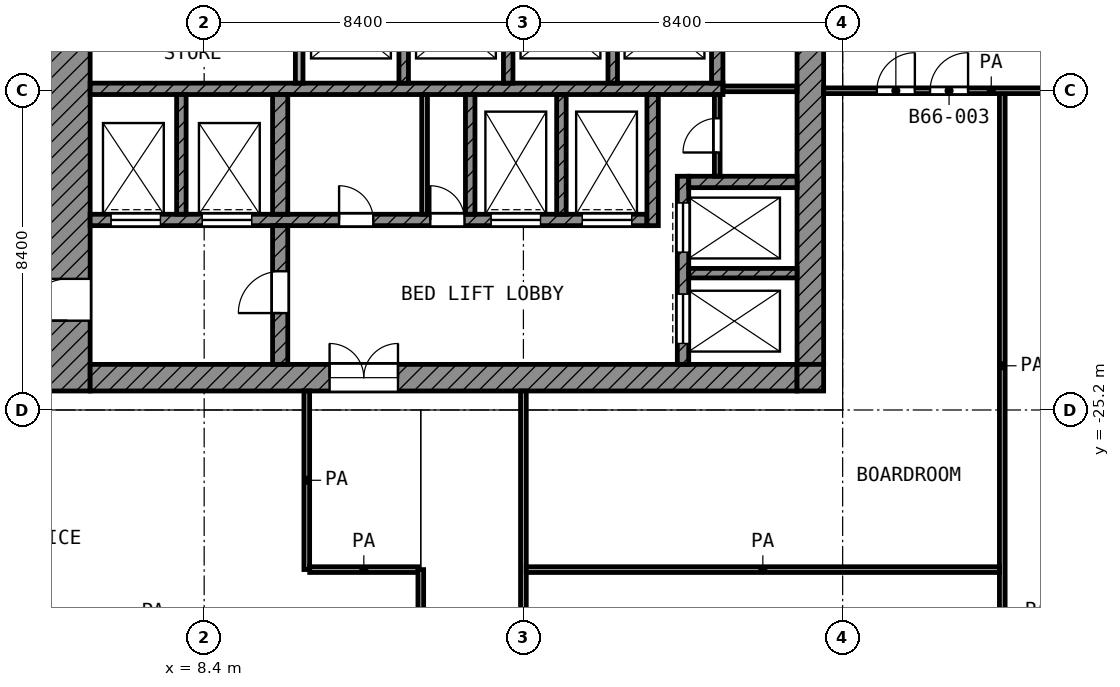
"""IFC4 building model, lengths in metres.
Left out: names, types, materials, properties, quantities, classifications, styles, units other than length and angle.
Written with IfcOpenShell. Run it as: python <this file> out.ifc"""

import sys

from ifc_helpers import new_model, si_unit, direction, frame, frame_2d, origin, place, context, subcontext, project, spatial, rectangle, extrude, element, fill, save


model = new_model("IFC4")
c1 = context("Model", 3, precision=1e-05, world=origin(), true_north=direction((0.0, 1.0)))
c2 = subcontext(c1, "Body", "Model", "MODEL_VIEW")
j1 = project(units=[si_unit("LENGTHUNIT", "METRE"), si_unit("PLANEANGLEUNIT", "RADIAN")], contexts=[c1])
p1 = place(None, origin())
s1 = spatial("IfcSite", under=j1, at=p1, CompositionType="ELEMENT")
p2 = place(p1, origin())
s2 = spatial("IfcBuilding", under=s1, at=p2, CompositionType="ELEMENT")
p3 = place(p2, frame((0.0, 0.0, 286.0)))
s3 = spatial("IfcBuildingStorey", under=s2, at=p3, CompositionType="ELEMENT", Elevation=286.0)
p4 = place(p3, frame((4.8, -24.7, 0.0), z_axis=(0.0, 0.0, 1.0), x_axis=(0.0, 1.0, 0.0)))
e1 = element("IfcWall", 1, at=p4, inside=s3, PredefinedType="SHEAR", context=c2, shape_type="SweptSolid", body=[
    extrude(rectangle(XDim=19.3, YDim=1.2, at=frame_2d((9.65, 0.0))), origin(), (0.0, 0.0, 1.0), 3.6),
])
p5 = place(p4, frame((11.15, 0.0, 0.0)))
e2 = element("IfcOpeningElement", 2, at=p5, cuts=e1, PredefinedType="OPENING", context=c2, shape_type="SweptSolid", body=[
    extrude(rectangle(XDim=1.1, YDim=2.1, at=frame_2d((0.55, 1.05))), frame((0.0, 0.61, 0.0), z_axis=(0.0, -1.0, 0.0), x_axis=(1.0, 0.0, 0.0)), (0.0, 0.0, 1.0), 1.22),
])
p6 = place(p4, frame((1.85, 0.0, 0.0)))
e3 = element("IfcOpeningElement", 3, at=p6, cuts=e1, PredefinedType="OPENING", context=c2, shape_type="SweptSolid", body=[
    extrude(rectangle(XDim=1.1, YDim=2.1, at=frame_2d((0.55, 1.05))), frame((0.0, 0.61, 0.0), z_axis=(0.0, -1.0, 0.0), x_axis=(1.0, 0.0, 0.0)), (0.0, 0.0, 1.0), 1.22),
])
p7 = place(p3, frame((24.35, -24.0, 0.0), z_axis=(0.0, 0.0, 1.0), x_axis=(0.0, 1.0, 0.0)))
e4 = element("IfcWall", 4, at=p7, inside=s3, PredefinedType="SHEAR", context=c2, shape_type="SweptSolid", body=[
    extrude(rectangle(XDim=18.6, YDim=0.7, at=frame_2d((9.3, 0.0))), origin(), (0.0, 0.0, 1.0), 3.6),
])
p8 = place(p7, frame((10.5, 0.0, 0.0)))
e5 = element("IfcOpeningElement", 5, at=p8, cuts=e4, PredefinedType="OPENING", context=c2, shape_type="SweptSolid", body=[
    extrude(rectangle(XDim=1.8, YDim=2.1, at=frame_2d((0.9, 1.05))), frame((0.0, 0.36, 0.0), z_axis=(0.0, -1.0, 0.0), x_axis=(1.0, 0.0, 0.0)), (0.0, 0.0, 1.0), 0.72),
])
p9 = place(p3, frame((5.4, -24.35, 0.0), z_axis=(0.0, 0.0, 1.0), x_axis=(1.0, 0.0, 0.0)))
e6 = element("IfcWall", 6, at=p9, inside=s3, PredefinedType="SHEAR", context=c2, shape_type="SweptSolid", body=[
    extrude(rectangle(XDim=18.6, YDim=0.7, at=frame_2d((9.3, 0.0))), origin(), (0.0, 0.0, 1.0), 3.6),
])
p10 = place(p9, frame((6.3, 0.0, 0.0)))
e7 = element("IfcOpeningElement", 7, at=p10, cuts=e6, PredefinedType="OPENING", context=c2, shape_type="SweptSolid", body=[
    extrude(rectangle(XDim=1.8, YDim=2.1, at=frame_2d((0.9, 1.05))), frame((0.0, 0.36, 0.0), z_axis=(0.0, -1.0, 0.0), x_axis=(1.0, 0.0, 0.0)), (0.0, 0.0, 1.0), 0.72),
])
p11 = place(p3, frame((24.35, -24.7, 0.0), z_axis=(0.0, 0.0, 1.0), x_axis=(0.0, 1.0, 0.0)))
e8 = element("IfcWall", 8, at=p11, inside=s3, PredefinedType="SHEAR", context=c2, shape_type="SweptSolid", body=[
    extrude(rectangle(XDim=0.7, YDim=0.7, at=frame_2d((0.35, 0.0))), origin(), (0.0, 0.0, 1.0), 3.6),
])
p12 = place(p3, frame((5.4, -16.75, 0.0), z_axis=(0.0, 0.0, 1.0), x_axis=(1.0, 0.0, 0.0)))
e9 = element("IfcWall", 9, at=p12, inside=s3, PredefinedType="SHEAR", context=c2, shape_type="SweptSolid", body=[
    extrude(rectangle(XDim=16.65, YDim=0.3, at=frame_2d((8.325, 0.0))), origin(), (0.0, 0.0, 1.0), 3.6),
])
p13 = place(p3, frame((5.4, -20.2, 0.0), z_axis=(0.0, 0.0, 1.0), x_axis=(1.0, 0.0, 0.0)))
e10 = element("IfcWall", 10, at=p13, inside=s3, PredefinedType="SHEAR", context=c2, shape_type="SweptSolid", body=[
    extrude(rectangle(XDim=14.65, YDim=0.3, at=frame_2d((7.325, 0.0))), origin(), (0.0, 0.0, 1.0), 3.6),
])
p14 = place(p13, frame((10.55, 0.0, 0.0)))
e11 = element("IfcOpeningElement", 11, at=p14, cuts=e10, PredefinedType="OPENING", context=c2, shape_type="SweptSolid", body=[
    extrude(rectangle(XDim=1.3, YDim=2.1, at=frame_2d((0.65, 1.05))), frame((0.0, 0.16, 0.0), z_axis=(0.0, -1.0, 0.0), x_axis=(1.0, 0.0, 0.0)), (0.0, 0.0, 1.0), 0.32),
])
p15 = place(p13, frame((12.95, 0.0, 0.0)))
e12 = element("IfcOpeningElement", 12, at=p15, cuts=e10, PredefinedType="OPENING", context=c2, shape_type="SweptSolid", body=[
    extrude(rectangle(XDim=1.3, YDim=2.1, at=frame_2d((0.65, 1.05))), frame((0.0, 0.16, 0.0), z_axis=(0.0, -1.0, 0.0), x_axis=(1.0, 0.0, 0.0)), (0.0, 0.0, 1.0), 0.32),
])
p16 = place(p13, frame((0.55, 0.0, 0.0)))
e13 = element("IfcOpeningElement", 13, at=p16, cuts=e10, PredefinedType="OPENING", context=c2, shape_type="SweptSolid", body=[
    extrude(rectangle(XDim=1.3, YDim=2.1, at=frame_2d((0.65, 1.05))), frame((0.0, 0.16, 0.0), z_axis=(0.0, -1.0, 0.0), x_axis=(1.0, 0.0, 0.0)), (0.0, 0.0, 1.0), 0.32),
])
p17 = place(p13, frame((2.95, 0.0, 0.0)))
e14 = element("IfcOpeningElement", 14, at=p17, cuts=e10, PredefinedType="OPENING", context=c2, shape_type="SweptSolid", body=[
    extrude(rectangle(XDim=1.3, YDim=2.1, at=frame_2d((0.65, 1.05))), frame((0.0, 0.16, 0.0), z_axis=(0.0, -1.0, 0.0), x_axis=(1.0, 0.0, 0.0)), (0.0, 0.0, 1.0), 0.32),
])
p18 = place(p13, frame((6.55, 0.0, 0.0)))
e15 = element("IfcOpeningElement", 15, at=p18, cuts=e10, PredefinedType="OPENING", context=c2, shape_type="SweptSolid", body=[
    extrude(rectangle(XDim=0.9, YDim=2.1, at=frame_2d((0.45, 1.05))), frame((0.0, 0.16, 0.0), z_axis=(0.0, -1.0, 0.0), x_axis=(1.0, 0.0, 0.0)), (0.0, 0.0, 1.0), 0.32),
])
p19 = place(p13, frame((8.95, 0.0, 0.0)))
e16 = element("IfcOpeningElement", 16, at=p19, cuts=e10, PredefinedType="OPENING", context=c2, shape_type="SweptSolid", body=[
    extrude(rectangle(XDim=0.9, YDim=2.1, at=frame_2d((0.45, 1.05))), frame((0.0, 0.16, 0.0), z_axis=(0.0, -1.0, 0.0), x_axis=(1.0, 0.0, 0.0)), (0.0, 0.0, 1.0), 0.32),
])
p20 = place(p3, frame((10.4, -24.0, 0.0), z_axis=(0.0, 0.0, 1.0), x_axis=(0.0, 1.0, 0.0)))
e17 = element("IfcWall", 17, at=p20, inside=s3, PredefinedType="SHEAR", context=c2, shape_type="SweptSolid", body=[
    extrude(rectangle(XDim=3.65, YDim=0.4, at=frame_2d((1.825, 0.0))), origin(), (0.0, 0.0, 1.0), 3.6),
])
p21 = place(p20, frame((1.35, 0.0, 0.0)))
e18 = element("IfcOpeningElement", 18, at=p21, cuts=e17, PredefinedType="OPENING", context=c2, shape_type="SweptSolid", body=[
    extrude(rectangle(XDim=1.1, YDim=2.1, at=frame_2d((0.55, 1.05))), frame((0.0, 0.21, 0.0), z_axis=(0.0, -1.0, 0.0), x_axis=(1.0, 0.0, 0.0)), (0.0, 0.0, 1.0), 0.42),
])
p22 = place(p3, frame((10.4, -20.05, 0.0), z_axis=(0.0, 0.0, 1.0), x_axis=(0.0, 1.0, 0.0)))
e19 = element("IfcWall", 19, at=p22, inside=s3, PredefinedType="SHEAR", context=c2, shape_type="SweptSolid", body=[
    extrude(rectangle(XDim=3.15, YDim=0.4, at=frame_2d((1.575, 0.0))), origin(), (0.0, 0.0, 1.0), 3.6),
])
p23 = place(p3, frame((20.2, -20.35, 0.0), z_axis=(0.0, 0.0, 1.0), x_axis=(0.0, 1.0, 0.0)))
e20 = element("IfcWall", 20, at=p23, inside=s3, PredefinedType="SHEAR", context=c2, shape_type="SweptSolid", body=[
    extrude(rectangle(XDim=3.45, YDim=0.3, at=frame_2d((1.725, 0.0))), origin(), (0.0, 0.0, 1.0), 3.6),
])
p24 = place(p3, frame((21.9, -16.6, 0.0), z_axis=(0.0, 0.0, 1.0), x_axis=(0.0, 1.0, 0.0)))
e21 = element("IfcWall", 21, at=p24, inside=s3, PredefinedType="SHEAR", context=c2, shape_type="SweptSolid", body=[
    extrude(rectangle(XDim=2.35, YDim=0.3, at=frame_2d((1.175, 0.0))), origin(), (0.0, 0.0, 1.0), 3.6),
])
p25 = place(p3, frame((21.15, -19.2, 0.0), z_axis=(0.0, 0.0, 1.0), x_axis=(1.0, 0.0, 0.0)))
e22 = element("IfcWall", 22, at=p25, inside=s3, PredefinedType="SHEAR", context=c2, shape_type="SweptSolid", body=[
    extrude(rectangle(XDim=2.85, YDim=0.3, at=frame_2d((1.425, 0.0))), origin(), (0.0, 0.0, 1.0), 3.6),
])
p26 = place(p3, frame((21.0, -24.0, 0.0), z_axis=(0.0, 0.0, 1.0), x_axis=(0.0, 1.0, 0.0)))
e23 = element("IfcWall", 23, at=p26, inside=s3, PredefinedType="SHEAR", context=c2, shape_type="SweptSolid", body=[
    extrude(rectangle(XDim=4.95, YDim=0.3, at=frame_2d((2.475, 0.0))), origin(), (0.0, 0.0, 1.0), 3.6),
])
p27 = place(p26, frame((2.95, 0.0, 0.0)))
e24 = element("IfcOpeningElement", 24, at=p27, cuts=e23, PredefinedType="OPENING", context=c2, shape_type="SweptSolid", body=[
    extrude(rectangle(XDim=1.3, YDim=2.1, at=frame_2d((0.65, 1.05))), frame((0.0, 0.16, 0.0), z_axis=(0.0, -1.0, 0.0), x_axis=(1.0, 0.0, 0.0)), (0.0, 0.0, 1.0), 0.32),
])
p28 = place(p26, frame((0.55, 0.0, 0.0)))
e25 = element("IfcOpeningElement", 25, at=p28, cuts=e23, PredefinedType="OPENING", context=c2, shape_type="SweptSolid", body=[
    extrude(rectangle(XDim=1.3, YDim=2.1, at=frame_2d((0.65, 1.05))), frame((0.0, 0.16, 0.0), z_axis=(0.0, -1.0, 0.0), x_axis=(1.0, 0.0, 0.0)), (0.0, 0.0, 1.0), 0.32),
])
p29 = place(p3, frame((21.15, -21.6, 0.0), z_axis=(0.0, 0.0, 1.0), x_axis=(1.0, 0.0, 0.0)))
e26 = element("IfcWall", 26, at=p29, inside=s3, PredefinedType="SHEAR", context=c2, shape_type="SweptSolid", body=[
    extrude(rectangle(XDim=2.85, YDim=0.25, at=frame_2d((1.425, 0.0))), origin(), (0.0, 0.0, 1.0), 3.6),
])
for number, where, z_axis, x_axis in (
    (27, (7.8, -20.05, 0.0), (0.0, 0.0, 1.0), (0.0, 1.0, 0.0)),
    (28, (15.4, -20.05, 0.0), (0.0, 0.0, 1.0), (0.0, 1.0, 0.0)),
    (29, (17.8, -20.05, 0.0), (0.0, 0.0, 1.0), (0.0, 1.0, 0.0)),
):
    element("IfcWall", number, at=place(p3, frame(where, z_axis=z_axis, x_axis=x_axis)), inside=s3, PredefinedType="SHEAR", context=c2, shape_type="SweptSolid", body=[
        extrude(rectangle(XDim=3.15, YDim=0.25, at=frame_2d((1.575, 0.0))), origin(), (0.0, 0.0, 1.0), 3.6),
    ])
p30 = place(p3, frame((10.9, -16.6, 0.0), z_axis=(0.0, 0.0, 1.0), x_axis=(0.0, 1.0, 0.0)))
e30 = element("IfcWall", 30, at=p30, inside=s3, PredefinedType="PARTITIONING", context=c2, shape_type="SweptSolid", body=[
    extrude(rectangle(XDim=2.35, YDim=0.2, at=frame_2d((1.175, 0.0))), origin(), (0.0, 0.0, 1.0), 3.6),
])
for number, where, z_axis, x_axis in (
    (31, (13.65, -16.6, 0.0), (0.0, 0.0, 1.0), (0.0, 1.0, 0.0)),
    (32, (16.4, -16.6, 0.0), (0.0, 0.0, 1.0), (0.0, 1.0, 0.0)),
    (33, (19.15, -16.6, 0.0), (0.0, 0.0, 1.0), (0.0, 1.0, 0.0)),
):
    element("IfcWall", number, at=place(p3, frame(where, z_axis=z_axis, x_axis=x_axis)), inside=s3, PredefinedType="SHEAR", context=c2, shape_type="SweptSolid", body=[
        extrude(rectangle(XDim=2.35, YDim=0.25, at=frame_2d((1.175, 0.0))), origin(), (0.0, 0.0, 1.0), 3.6),
    ])
p31 = place(p3, frame((21.9, -19.05, 0.0), z_axis=(0.0, 0.0, 1.0), x_axis=(0.0, 1.0, 0.0)))
e34 = element("IfcWall", 34, at=p31, inside=s3, PredefinedType="PARTITIONING", context=c2, shape_type="SweptSolid", body=[
    extrude(rectangle(XDim=2.15, YDim=0.15, at=frame_2d((1.075, 0.0))), origin(), (0.0, 0.0, 1.0), 3.6),
])
p32 = place(p31, frame((0.625, 0.0, 0.0)))
e35 = element("IfcOpeningElement", 35, at=p32, cuts=e34, PredefinedType="OPENING", context=c2, shape_type="SweptSolid", body=[
    extrude(rectangle(XDim=0.9, YDim=2.1, at=frame_2d((0.45, 1.05))), frame((0.0, 0.085, 0.0), z_axis=(0.0, -1.0, 0.0), x_axis=(1.0, 0.0, 0.0)), (0.0, 0.0, 1.0), 0.17),
])
p33 = place(p3, frame((22.05, -16.75, 0.0), z_axis=(0.0, 0.0, 1.0), x_axis=(1.0, 0.0, 0.0)))
e36 = element("IfcWall", 36, at=p33, inside=s3, PredefinedType="PARTITIONING", context=c2, shape_type="SweptSolid", body=[
    extrude(rectangle(XDim=1.95, YDim=0.15, at=frame_2d((0.975, 0.0))), origin(), (0.0, 0.0, 1.0), 3.6),
])
p34 = place(p3, frame((14.2, -20.05, 0.0), z_axis=(0.0, 0.0, 1.0), x_axis=(0.0, 1.0, 0.0)))
e37 = element("IfcWall", 37, at=p34, inside=s3, PredefinedType="PARTITIONING", context=c2, shape_type="SweptSolid", body=[
    extrude(rectangle(XDim=3.15, YDim=0.15, at=frame_2d((1.575, 0.0))), origin(), (0.0, 0.0, 1.0), 3.6),
])
p35 = place(p3, frame((11.177, -29.4, 0.0), z_axis=(0.0, 0.0, 1.0), x_axis=(1.0, 0.0, 0.0)))
e38 = element("IfcWall", 38, at=p35, inside=s3, PredefinedType="PARTITIONING", context=c2, shape_type="SweptSolid", body=[
    extrude(rectangle(XDim=2.848, YDim=0.15, at=frame_2d((1.424, 0.0))), origin(), (0.0, 0.0, 1.0), 3.6),
])
p36 = place(p3, frame((16.875, -29.4, 0.0), z_axis=(0.0, 0.0, 1.0), x_axis=(1.0, 0.0, 0.0)))
e39 = element("IfcWall", 39, at=p36, inside=s3, PredefinedType="PARTITIONING", context=c2, shape_type="SweptSolid", body=[
    extrude(rectangle(XDim=12.45, YDim=0.15, at=frame_2d((6.225, 0.0))), origin(), (0.0, 0.0, 1.0), 3.6),
])
p37 = place(p3, frame((24.7, -16.8, 0.0), z_axis=(0.0, 0.0, 1.0), x_axis=(1.0, 0.0, 0.0)))
e40 = element("IfcWall", 40, at=p37, inside=s3, PredefinedType="PARTITIONING", context=c2, shape_type="SweptSolid", body=[
    extrude(rectangle(XDim=8.82, YDim=0.15, at=frame_2d((4.41, 0.0))), origin(), (0.0, 0.0, 1.0), 3.6),
])
p38 = place(p37, frame((2.8, 0.0, 0.0)))
e41 = element("IfcOpeningElement", 41, at=p38, cuts=e40, PredefinedType="OPENING", context=c2, shape_type="SweptSolid", body=[
    extrude(rectangle(XDim=1.0, YDim=2.1, at=frame_2d((0.5, 1.05))), frame((0.0, 0.085, 0.0), z_axis=(0.0, -1.0, 0.0), x_axis=(1.0, 0.0, 0.0)), (0.0, 0.0, 1.0), 0.17),
])
p39 = place(p37, frame((1.4, 0.0, 0.0)))
e42 = element("IfcOpeningElement", 42, at=p39, cuts=e40, PredefinedType="OPENING", context=c2, shape_type="SweptSolid", body=[
    extrude(rectangle(XDim=1.0, YDim=2.1, at=frame_2d((0.5, 1.05))), frame((0.0, 0.085, 0.0), z_axis=(0.0, -1.0, 0.0), x_axis=(1.0, 0.0, 0.0)), (0.0, 0.0, 1.0), 0.17),
])
p40 = place(p37, frame((6.2, 0.0, 0.0)))
e43 = element("IfcOpeningElement", 43, at=p40, cuts=e40, PredefinedType="OPENING", context=c2, shape_type="SweptSolid", body=[
    extrude(rectangle(XDim=1.2, YDim=2.1, at=frame_2d((0.6, 1.05))), frame((0.0, 0.085, 0.0), z_axis=(0.0, -1.0, 0.0), x_axis=(1.0, 0.0, 0.0)), (0.0, 0.0, 1.0), 0.17),
])
p41 = place(p3, frame((11.1, -29.399, 0.0), z_axis=(0.0, 0.0, 1.0), x_axis=(0.0, 1.0, 0.0)))
e44 = element("IfcWall", 44, at=p41, inside=s3, PredefinedType="PARTITIONING", context=c2, shape_type="SweptSolid", body=[
    extrude(rectangle(XDim=4.699, YDim=0.15, at=frame_2d((2.35, 0.0))), origin(), (0.0, 0.0, 1.0), 3.6),
])
p42 = place(p3, frame((14.1, -31.957, 0.0), z_axis=(0.0, 0.0, 1.0), x_axis=(0.0, 1.0, 0.0)))
e45 = element("IfcWall", 45, at=p42, inside=s3, PredefinedType="PARTITIONING", context=c2, shape_type="SweptSolid", body=[
    extrude(rectangle(XDim=2.557, YDim=0.15, at=frame_2d((1.279, 0.0))), origin(), (0.0, 0.0, 1.0), 3.6),
])
p43 = place(p3, frame((16.8, -46.12, 0.0), z_axis=(0.0, 0.0, 1.0), x_axis=(0.0, 1.0, 0.0)))
e46 = element("IfcWall", 46, at=p43, inside=s3, PredefinedType="PARTITIONING", context=c2, shape_type="SweptSolid", body=[
    extrude(rectangle(XDim=21.42, YDim=0.15, at=frame_2d((10.71, 0.0))), origin(), (0.0, 0.0, 1.0), 3.6),
])
p44 = place(p43, frame((13.02, 0.0, 0.0)))
e47 = element("IfcOpeningElement", 47, at=p44, cuts=e46, PredefinedType="OPENING", context=c2, shape_type="SweptSolid", body=[
    extrude(rectangle(XDim=1.0, YDim=2.1, at=frame_2d((0.5, 1.05))), frame((0.0, 0.085, 0.0), z_axis=(0.0, -1.0, 0.0), x_axis=(1.0, 0.0, 0.0)), (0.0, 0.0, 1.0), 0.17),
])
p45 = place(p43, frame((6.02, 0.0, 0.0)))
e48 = element("IfcOpeningElement", 48, at=p45, cuts=e46, PredefinedType="OPENING", context=c2, shape_type="SweptSolid", body=[
    extrude(rectangle(XDim=1.0, YDim=2.1, at=frame_2d((0.5, 1.05))), frame((0.0, 0.085, 0.0), z_axis=(0.0, -1.0, 0.0), x_axis=(1.0, 0.0, 0.0)), (0.0, 0.0, 1.0), 0.17),
])
p46 = place(p43, frame((1.52, 0.0, 0.0)))
e49 = element("IfcOpeningElement", 49, at=p46, cuts=e46, PredefinedType="OPENING", context=c2, shape_type="SweptSolid", body=[
    extrude(rectangle(XDim=1.0, YDim=2.1, at=frame_2d((0.5, 1.05))), frame((0.0, 0.085, 0.0), z_axis=(0.0, -1.0, 0.0), x_axis=(1.0, 0.0, 0.0)), (0.0, 0.0, 1.0), 0.17),
])
p47 = place(p3, frame((29.4, -31.198, 0.0), z_axis=(0.0, 0.0, 1.0), x_axis=(0.0, 1.0, 0.0)))
e50 = element("IfcWall", 50, at=p47, inside=s3, PredefinedType="PARTITIONING", context=c2, shape_type="SweptSolid", body=[
    extrude(rectangle(XDim=14.323, YDim=0.15, at=frame_2d((7.162, 0.0))), origin(), (0.0, 0.0, 1.0), 3.6),
])
p48 = place(p27, origin())
e51 = element("IfcDoor", 51, at=p48, inside=s3, OperationType="DOUBLE_DOOR_SLIDING", PredefinedType="DOOR", context=c2, shape_type="SweptSolid", body=[
    extrude(rectangle(XDim=1.3, YDim=2.1, at=frame_2d((0.65, 1.05))), frame((0.0, 0.025, 0.0), z_axis=(0.0, -1.0, 0.0), x_axis=(1.0, 0.0, 0.0)), (0.0, 0.0, 1.0), 0.05),
])
fill(e24, e51)
p49 = place(p28, origin())
e52 = element("IfcDoor", 52, at=p49, inside=s3, OperationType="DOUBLE_DOOR_SLIDING", PredefinedType="DOOR", context=c2, shape_type="SweptSolid", body=[
    extrude(rectangle(XDim=1.3, YDim=2.1, at=frame_2d((0.65, 1.05))), frame((0.0, 0.025, 0.0), z_axis=(0.0, -1.0, 0.0), x_axis=(1.0, 0.0, 0.0)), (0.0, 0.0, 1.0), 0.05),
])
fill(e25, e52)
p50 = place(p14, origin())
e53 = element("IfcDoor", 53, at=p50, inside=s3, OperationType="DOUBLE_DOOR_SLIDING", PredefinedType="DOOR", context=c2, shape_type="SweptSolid", body=[
    extrude(rectangle(XDim=1.3, YDim=2.1, at=frame_2d((0.65, 1.05))), frame((0.0, 0.025, 0.0), z_axis=(0.0, -1.0, 0.0), x_axis=(1.0, 0.0, 0.0)), (0.0, 0.0, 1.0), 0.05),
])
fill(e11, e53)
p51 = place(p15, origin())
e54 = element("IfcDoor", 54, at=p51, inside=s3, OperationType="DOUBLE_DOOR_SLIDING", PredefinedType="DOOR", context=c2, shape_type="SweptSolid", body=[
    extrude(rectangle(XDim=1.3, YDim=2.1, at=frame_2d((0.65, 1.05))), frame((0.0, 0.025, 0.0), z_axis=(0.0, -1.0, 0.0), x_axis=(1.0, 0.0, 0.0)), (0.0, 0.0, 1.0), 0.05),
])
fill(e12, e54)
p52 = place(p16, origin())
e55 = element("IfcDoor", 55, at=p52, inside=s3, OperationType="DOUBLE_DOOR_SLIDING", PredefinedType="DOOR", context=c2, shape_type="SweptSolid", body=[
    extrude(rectangle(XDim=1.3, YDim=2.1, at=frame_2d((0.65, 1.05))), frame((0.0, 0.025, 0.0), z_axis=(0.0, -1.0, 0.0), x_axis=(1.0, 0.0, 0.0)), (0.0, 0.0, 1.0), 0.05),
])
fill(e13, e55)
p53 = place(p17, origin())
e56 = element("IfcDoor", 56, at=p53, inside=s3, OperationType="DOUBLE_DOOR_SLIDING", PredefinedType="DOOR", context=c2, shape_type="SweptSolid", body=[
    extrude(rectangle(XDim=1.3, YDim=2.1, at=frame_2d((0.65, 1.05))), frame((0.0, 0.025, 0.0), z_axis=(0.0, -1.0, 0.0), x_axis=(1.0, 0.0, 0.0)), (0.0, 0.0, 1.0), 0.05),
])
fill(e14, e56)
p54 = place(p6, origin())
e57 = element("IfcDoor", 57, at=p54, inside=s3, OperationType="SINGLE_SWING_LEFT", PredefinedType="DOOR", context=c2, shape_type="SweptSolid", body=[
    extrude(rectangle(XDim=1.1, YDim=2.1, at=frame_2d((0.55, 1.05))), frame((0.0, 0.025, 0.0), z_axis=(0.0, -1.0, 0.0), x_axis=(1.0, 0.0, 0.0)), (0.0, 0.0, 1.0), 0.05),
])
fill(e3, e57)
p55 = place(p21, origin())
e58 = element("IfcDoor", 58, at=p55, inside=s3, OperationType="SINGLE_SWING_LEFT", PredefinedType="DOOR", context=c2, shape_type="SweptSolid", body=[
    extrude(rectangle(XDim=1.1, YDim=2.1, at=frame_2d((0.55, 1.05))), frame((0.0, 0.025, 0.0), z_axis=(0.0, -1.0, 0.0), x_axis=(1.0, 0.0, 0.0)), (0.0, 0.0, 1.0), 0.05),
])
fill(e18, e58)
p56 = place(p10, origin())
e59 = element("IfcDoor", 59, at=p56, inside=s3, OperationType="DOUBLE_DOOR_SINGLE_SWING", PredefinedType="DOOR", context=c2, shape_type="SweptSolid", body=[
    extrude(rectangle(XDim=1.8, YDim=2.1, at=frame_2d((0.9, 1.05))), frame((0.0, 0.025, 0.0), z_axis=(0.0, -1.0, 0.0), x_axis=(1.0, 0.0, 0.0)), (0.0, 0.0, 1.0), 0.05),
])
fill(e7, e59)
p57 = place(p32, origin())
e60 = element("IfcDoor", 60, at=p57, inside=s3, OperationType="SINGLE_SWING_LEFT", PredefinedType="DOOR", context=c2, shape_type="SweptSolid", body=[
    extrude(rectangle(XDim=0.9, YDim=2.1, at=frame_2d((0.45, 1.05))), frame((0.0, 0.025, 0.0), z_axis=(0.0, -1.0, 0.0), x_axis=(1.0, 0.0, 0.0)), (0.0, 0.0, 1.0), 0.05),
])
fill(e35, e60)
p58 = place(p18, origin())
e61 = element("IfcDoor", 61, at=p58, inside=s3, OperationType="SINGLE_SWING_LEFT", PredefinedType="DOOR", context=c2, shape_type="SweptSolid", body=[
    extrude(rectangle(XDim=0.9, YDim=2.1, at=frame_2d((0.45, 1.05))), frame((0.0, 0.025, 0.0), z_axis=(0.0, -1.0, 0.0), x_axis=(1.0, 0.0, 0.0)), (0.0, 0.0, 1.0), 0.05),
])
fill(e15, e61)
p59 = place(p19, origin())
e62 = element("IfcDoor", 62, at=p59, inside=s3, OperationType="SINGLE_SWING_LEFT", PredefinedType="DOOR", context=c2, shape_type="SweptSolid", body=[
    extrude(rectangle(XDim=0.9, YDim=2.1, at=frame_2d((0.45, 1.05))), frame((0.0, 0.025, 0.0), z_axis=(0.0, -1.0, 0.0), x_axis=(1.0, 0.0, 0.0)), (0.0, 0.0, 1.0), 0.05),
])
fill(e16, e62)
p60 = place(p38, origin())
e63 = element("IfcDoor", 63, at=p60, inside=s3, OperationType="SINGLE_SWING_RIGHT", PredefinedType="DOOR", context=c2, shape_type="SweptSolid", body=[
    extrude(rectangle(XDim=1.0, YDim=2.1, at=frame_2d((0.5, 1.05))), frame((0.0, 0.025, 0.0), z_axis=(0.0, -1.0, 0.0), x_axis=(1.0, 0.0, 0.0)), (0.0, 0.0, 1.0), 0.05),
])
fill(e41, e63)
p61 = place(p39, origin())
e64 = element("IfcDoor", 64, at=p61, inside=s3, OperationType="SINGLE_SWING_RIGHT", PredefinedType="DOOR", context=c2, shape_type="SweptSolid", body=[
    extrude(rectangle(XDim=1.0, YDim=2.1, at=frame_2d((0.5, 1.05))), frame((0.0, 0.025, 0.0), z_axis=(0.0, -1.0, 0.0), x_axis=(1.0, 0.0, 0.0)), (0.0, 0.0, 1.0), 0.05),
])
fill(e42, e64)
save(model, sys.argv[1])
